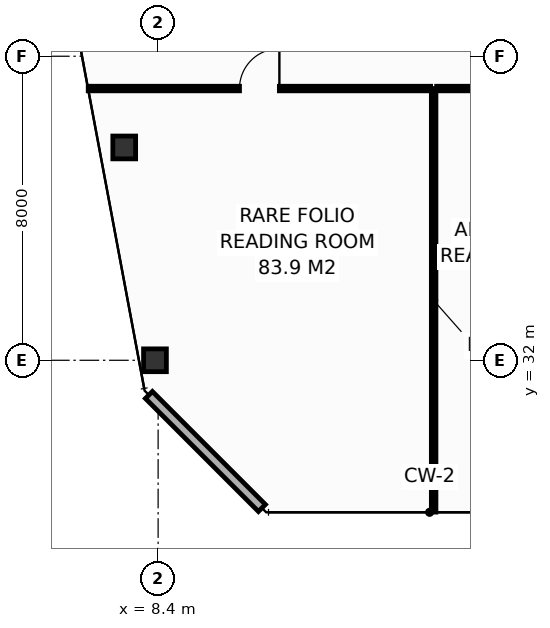
"""IFC4 building model, lengths in metres.
Left out: names, types, materials, properties, quantities, classifications, styles, units other than length and angle.
Written with IfcOpenShell. Run it as: python <this file> out.ifc"""

import sys

from ifc_helpers import new_model, si_unit, direction, frame, frame_2d, origin, origin_2d, place, context, subcontext, project, spatial, rectangle, hollow_rectangle, extrude, element, fill, save


model = new_model("IFC4")
c1 = context("Model", 3, precision=1e-05, world=origin(), true_north=direction((0.0, 1.0)))
c2 = subcontext(c1, "Body", "Model", "MODEL_VIEW")
j1 = project(units=[si_unit("LENGTHUNIT", "METRE"), si_unit("PLANEANGLEUNIT", "RADIAN")], contexts=[c1])
p1 = place(None, origin())
s1 = spatial("IfcSite", under=j1, at=p1, CompositionType="ELEMENT")
p2 = place(p1, origin())
s2 = spatial("IfcBuilding", under=s1, at=p2, CompositionType="ELEMENT")
p3 = place(p2, frame((0.0, 0.0, 280.0)))
s3 = spatial("IfcBuildingStorey", under=s2, at=p3, CompositionType="ELEMENT", Elevation=280.0)
for number, where, z_axis, x_axis in (
    (1, (8.317, 32.0, 0.0), (0.0, 0.0, 1.0), (1.0, 0.0, 0.0)),
    (2, (7.508, 37.6, 0.0), (0.0, 0.0, 1.0), (1.0, 0.0, 0.0)),
):
    element("IfcColumn", number, at=place(p3, frame(where, z_axis=z_axis, x_axis=x_axis)), inside=s3, PredefinedType="COLUMN", context=c2, shape_type="SweptSolid", body=[
        extrude(hollow_rectangle(XDim=0.6, YDim=0.6, WallThickness=0.028, at=origin_2d()), origin(), (0.0, 0.0, 1.0), 3.8),
    ])
p4 = place(p3, frame((8.157, 31.087, 0.0), z_axis=(0.0, 0.0, 1.0), x_axis=(0.707106781187, -0.707106781187, 0.0)))
e3 = element("IfcWall", 3, at=p4, inside=s3, PredefinedType="STANDARD", context=c2, shape_type="SweptSolid", body=[
    extrude(rectangle(XDim=4.206, YDim=0.26, at=frame_2d((2.103, 0.0))), origin(), (0.0, 0.0, 1.0), 3.55),
])
p5 = place(p3, frame((15.65, 28.005, 0.0), z_axis=(0.0, 0.0, 1.0), x_axis=(0.0, 1.0, 0.0)))
e4 = element("IfcWall", 4, at=p5, inside=s3, PredefinedType="PARTITIONING", context=c2, shape_type="SweptSolid", body=[
    extrude(rectangle(XDim=11.145, YDim=0.12, at=frame_2d((5.573, 0.0))), origin(), (0.0, 0.0, 1.0), 3.047),
])
p6 = place(p3, frame((6.561, 39.15, 0.0), z_axis=(0.0, 0.0, 1.0), x_axis=(1.0, 0.0, 0.0)))
e5 = element("IfcWall", 5, at=p6, inside=s3, PredefinedType="PARTITIONING", context=c2, shape_type="SweptSolid", body=[
    extrude(rectangle(XDim=9.009, YDim=0.12, at=frame_2d((4.505, 0.0))), origin(), (0.0, 0.0, 1.0), 3.085),
])
p7 = place(p6, frame((3.98, 0.0, 0.0)))
e6 = element("IfcOpeningElement", 6, at=p7, cuts=e5, PredefinedType="OPENING", context=c2, shape_type="SweptSolid", body=[
    extrude(rectangle(XDim=1.05, YDim=2.15, at=frame_2d((0.525, 1.075))), frame((0.0, 0.07, 0.0), z_axis=(0.0, -1.0, 0.0), x_axis=(1.0, 0.0, 0.0)), (0.0, 0.0, 1.0), 0.14),
])
p8 = place(p3, frame((15.73, 39.15, 0.0), z_axis=(0.0, 0.0, 1.0), x_axis=(1.0, 0.0, 0.0)))
e7 = element("IfcWall", 7, at=p8, inside=s3, PredefinedType="PARTITIONING", context=c2, shape_type="SweptSolid", body=[
    extrude(rectangle(XDim=6.502, YDim=0.12, at=frame_2d((3.251, 0.0))), origin(), (0.0, 0.0, 1.0), 3.047),
])
p9 = place(p8, frame((2.726, 0.0, 0.0)))
e8 = element("IfcOpeningElement", 8, at=p9, cuts=e7, PredefinedType="OPENING", context=c2, shape_type="SweptSolid", body=[
    extrude(rectangle(XDim=1.05, YDim=2.15, at=frame_2d((0.525, 1.075))), frame((0.0, 0.07, 0.0), z_axis=(0.0, -1.0, 0.0), x_axis=(1.0, 0.0, 0.0)), (0.0, 0.0, 1.0), 0.14),
])
p10 = place(p7, origin())
e9 = element("IfcDoor", 9, at=p10, inside=s3, OperationType="SINGLE_SWING_RIGHT", PredefinedType="DOOR", context=c2, shape_type="SweptSolid", body=[
    extrude(rectangle(XDim=1.05, YDim=2.15, at=frame_2d((0.525, 1.075))), frame((0.0, 0.025, 0.0), z_axis=(0.0, -1.0, 0.0), x_axis=(1.0, 0.0, 0.0)), (0.0, 0.0, 1.0), 0.05),
])
fill(e6, e9)
save(model, sys.argv[1])
